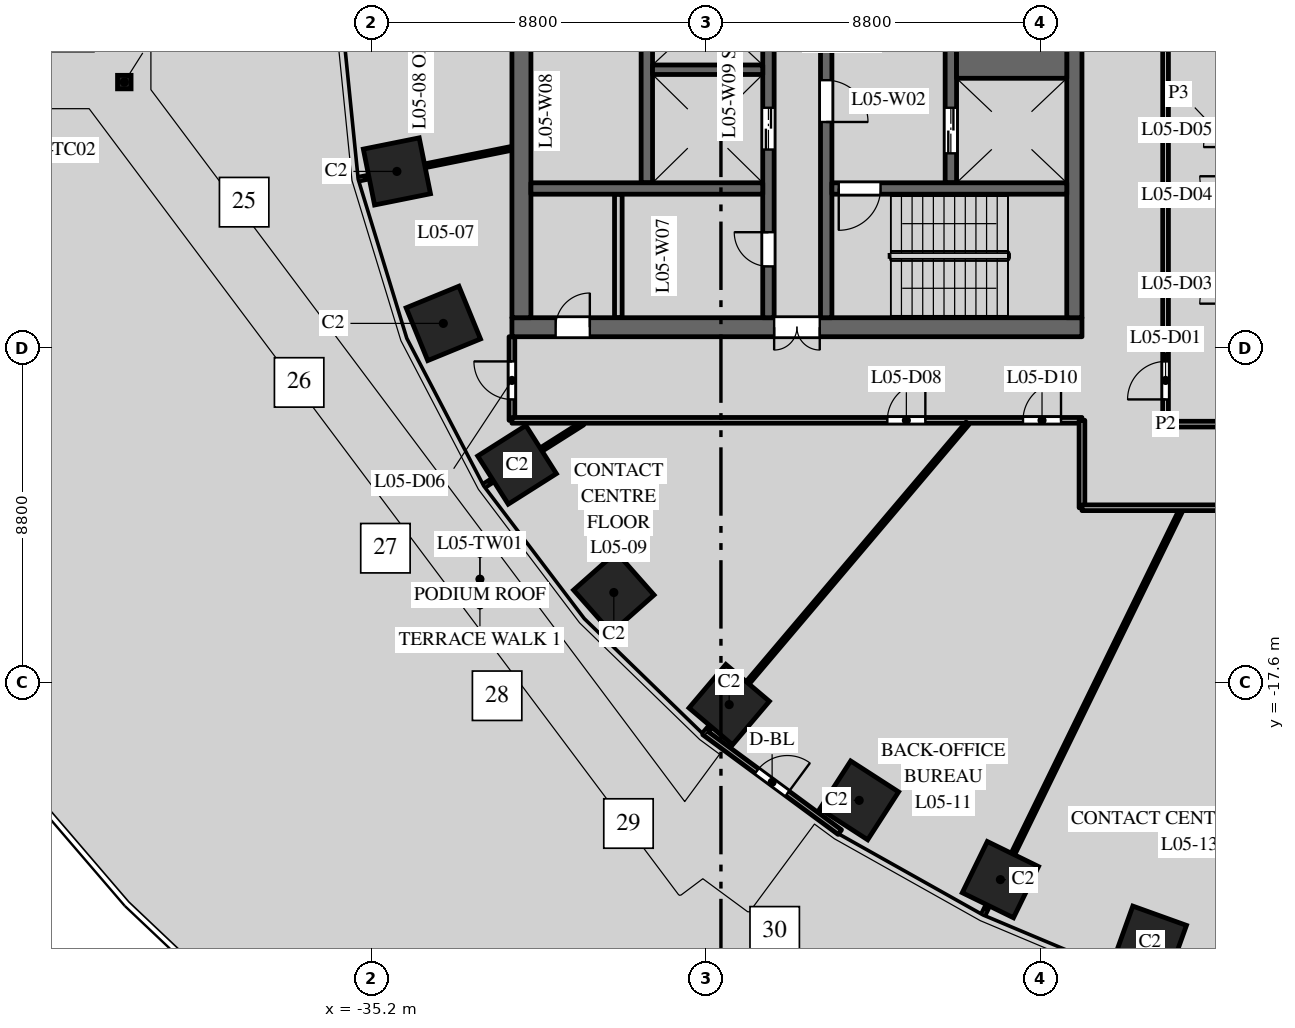
"""IFC4 building model, lengths in metres.
Left out: names, types, materials, properties, quantities, classifications, styles, units other than length and angle.
Written with IfcOpenShell. Run it as: python <this file> out.ifc"""

import sys

from ifc_helpers import new_model, si_unit, direction, frame, frame_2d, origin, origin_2d, place, context, subcontext, project, spatial, rectangle, hollow_circle, extrude, element, fill, save


model = new_model("IFC4")
c1 = context("Model", 3, precision=1e-05, world=origin(), true_north=direction((0.0, 1.0)))
c2 = subcontext(c1, "Body", "Model", "MODEL_VIEW")
j1 = project(units=[si_unit("LENGTHUNIT", "METRE"), si_unit("PLANEANGLEUNIT", "RADIAN")], contexts=[c1])
p1 = place(None, origin())
s1 = spatial("IfcSite", under=j1, at=p1, CompositionType="ELEMENT")
p2 = place(p1, origin())
s2 = spatial("IfcBuilding", under=s1, at=p2, CompositionType="ELEMENT")
p3 = place(p2, frame((0.0, 0.0, 30.5)))
s3 = spatial("IfcBuildingStorey", under=s2, at=p3, CompositionType="ELEMENT", Elevation=30.5)
for number, where, z_axis, x_axis in (
    (1, (-34.527, -4.151, 0.0), (0.0, 0.0, 1.0), (0.197, -0.98, 0.0)),
    (2, (-33.305, -8.149, 0.0), (0.0, 0.0, 1.0), (0.379, -0.925, 0.0)),
    (3, (-31.365, -11.871, 0.0), (0.0, 0.0, 1.0), (0.535, -0.845, 0.0)),
    (4, (-28.819, -15.23, 0.0), (0.0, 0.0, 1.0), (0.663, -0.749, 0.0)),
    (5, (-25.783, -18.18, 0.0), (0.0, 0.0, 1.0), (0.763, -0.646, 0.0)),
    (6, (-22.362, -20.7, 0.0), (0.0, 0.0, 1.0), (0.84, -0.542, 0.0)),
    (7, (-18.646, -22.785, 0.0), (0.0, 0.0, 1.0), (0.898, -0.439, 0.0)),
    (8, (-14.709, -24.441, 0.0), (0.0, 0.0, 1.0), (0.941, -0.338, 0.0)),
):
    element("IfcColumn", number, at=place(p3, frame(where, z_axis=z_axis, x_axis=x_axis)), inside=s3, PredefinedType="COLUMN", context=c2, shape_type="SweptSolid", body=[
        extrude(rectangle(XDim=1.5, YDim=1.5, at=origin_2d()), origin(), (0.0, 0.0, 1.0), 4.0),
    ])
p4 = place(p3, frame((-16.5, -8.25, 0.0), z_axis=(0.0, 0.0, 1.0), x_axis=(-1.0, 0.0, 0.0)))
e9 = element("IfcWall", 9, at=p4, inside=s3, PredefinedType="SHEAR", context=c2, shape_type="SweptSolid", body=[
    extrude(rectangle(XDim=15.0, YDim=0.5, at=frame_2d((7.5, 0.0))), origin(), (0.0, 0.0, 1.0), 3.7),
])
p5 = place(p4, frame((6.9, 0.0, 0.0)))
e10 = element("IfcOpeningElement", 10, at=p5, cuts=e9, PredefinedType="OPENING", context=c2, shape_type="SweptSolid", body=[
    extrude(rectangle(XDim=1.2, YDim=2.1, at=frame_2d((0.6, 1.05))), frame((0.0, 0.26, 0.0), z_axis=(0.0, -1.0, 0.0), x_axis=(1.0, 0.0, 0.0)), (0.0, 0.0, 1.0), 0.52),
])
p6 = place(p4, frame((12.95, 0.0, 0.0)))
e11 = element("IfcOpeningElement", 11, at=p6, cuts=e9, PredefinedType="OPENING", context=c2, shape_type="SweptSolid", body=[
    extrude(rectangle(XDim=0.9, YDim=2.1, at=frame_2d((0.45, 1.05))), frame((0.0, 0.26, 0.0), z_axis=(0.0, -1.0, 0.0), x_axis=(1.0, 0.0, 0.0)), (0.0, 0.0, 1.0), 0.52),
])
p7 = place(p3, frame((-27.95, -4.45, 0.0), z_axis=(0.0, 0.0, 1.0), x_axis=(0.0, 1.0, 0.0)))
e12 = element("IfcWall", 12, at=p7, inside=s3, PredefinedType="SHEAR", context=c2, shape_type="SweptSolid", body=[
    extrude(rectangle(XDim=8.9, YDim=0.3, at=frame_2d((4.45, 0.0))), origin(), (0.0, 0.0, 1.0), 3.7),
])
p8 = place(p3, frame((-19.95, -4.45, 0.0), z_axis=(0.0, 0.0, 1.0), x_axis=(0.0, 1.0, 0.0)))
e13 = element("IfcWall", 13, at=p8, inside=s3, PredefinedType="SHEAR", context=c2, shape_type="SweptSolid", body=[
    extrude(rectangle(XDim=8.9, YDim=0.3, at=frame_2d((4.45, 0.0))), origin(), (0.0, 0.0, 1.0), 3.7),
])
p9 = place(p8, frame((0.775, 0.0, 0.0)))
e14 = element("IfcOpeningElement", 14, at=p9, cuts=e13, PredefinedType="OPENING", context=c2, shape_type="SweptSolid", body=[
    extrude(rectangle(XDim=1.2, YDim=2.1, at=frame_2d((0.6, 1.05))), frame((0.0, 0.16, 0.0), z_axis=(0.0, -1.0, 0.0), x_axis=(1.0, 0.0, 0.0)), (0.0, 0.0, 1.0), 0.32),
])
p10 = place(p8, frame((7.35, 0.0, 0.0)))
e15 = element("IfcOpeningElement", 15, at=p10, cuts=e13, PredefinedType="OPENING", context=c2, shape_type="SweptSolid", body=[
    extrude(rectangle(XDim=0.9, YDim=2.1, at=frame_2d((0.45, 1.05))), frame((0.0, 0.16, 0.0), z_axis=(0.0, -1.0, 0.0), x_axis=(1.0, 0.0, 0.0)), (0.0, 0.0, 1.0), 0.32),
])
p11 = place(p3, frame((-24.75, -8.0, 0.0), z_axis=(0.0, 0.0, 1.0), x_axis=(0.0, 1.0, 0.0)))
e16 = element("IfcWall", 16, at=p11, inside=s3, PredefinedType="SHEAR", context=c2, shape_type="SweptSolid", body=[
    extrude(rectangle(XDim=16.0, YDim=0.3, at=frame_2d((8.0, 0.0))), origin(), (0.0, 0.0, 1.0), 3.7),
])
p12 = place(p11, frame((4.425, 0.0, 0.0)))
e17 = element("IfcOpeningElement", 17, at=p12, cuts=e16, PredefinedType="OPENING", context=c2, shape_type="SweptSolid", body=[
    extrude(rectangle(XDim=1.1, YDim=2.1, at=frame_2d((0.55, 1.05))), frame((0.0, 0.16, 0.0), z_axis=(0.0, -1.0, 0.0), x_axis=(1.0, 0.0, 0.0)), (0.0, 0.0, 1.0), 0.32),
])
p13 = place(p11, frame((7.45, 0.0, 0.0)))
e18 = element("IfcOpeningElement", 18, at=p13, cuts=e16, PredefinedType="OPENING", context=c2, shape_type="SweptSolid", body=[
    extrude(rectangle(XDim=1.1, YDim=2.1, at=frame_2d((0.55, 1.05))), frame((0.0, 0.16, 0.0), z_axis=(0.0, -1.0, 0.0), x_axis=(1.0, 0.0, 0.0)), (0.0, 0.0, 1.0), 0.32),
])
p14 = place(p11, frame((10.425, 0.0, 0.0)))
e19 = element("IfcOpeningElement", 19, at=p14, cuts=e16, PredefinedType="OPENING", context=c2, shape_type="SweptSolid", body=[
    extrude(rectangle(XDim=1.2, YDim=2.1, at=frame_2d((0.6, 1.05))), frame((0.0, 0.16, 0.0), z_axis=(0.0, -1.0, 0.0), x_axis=(1.0, 0.0, 0.0)), (0.0, 0.0, 1.0), 0.32),
])
p15 = place(p11, frame((13.75, 0.0, 0.0)))
e20 = element("IfcOpeningElement", 20, at=p15, cuts=e16, PredefinedType="OPENING", context=c2, shape_type="SweptSolid", body=[
    extrude(rectangle(XDim=0.9, YDim=2.1, at=frame_2d((0.45, 1.05))), frame((0.0, 0.16, 0.0), z_axis=(0.0, -1.0, 0.0), x_axis=(1.0, 0.0, 0.0)), (0.0, 0.0, 1.0), 0.32),
])
p16 = place(p11, frame((1.35, 0.0, 0.0)))
e21 = element("IfcOpeningElement", 21, at=p16, cuts=e16, PredefinedType="OPENING", context=c2, shape_type="SweptSolid", body=[
    extrude(rectangle(XDim=0.9, YDim=2.1, at=frame_2d((0.45, 1.05))), frame((0.0, 0.16, 0.0), z_axis=(0.0, -1.0, 0.0), x_axis=(1.0, 0.0, 0.0)), (0.0, 0.0, 1.0), 0.32),
])
p17 = place(p3, frame((-16.7, -8.0, 0.0), z_axis=(0.0, 0.0, 1.0), x_axis=(0.0, 1.0, 0.0)))
e22 = element("IfcWall", 22, at=p17, inside=s3, PredefinedType="SHEAR", context=c2, shape_type="SweptSolid", body=[
    extrude(rectangle(XDim=16.0, YDim=0.4, at=frame_2d((8.0, 0.0))), origin(), (0.0, 0.0, 1.0), 3.7),
])
p18 = place(p3, frame((-31.25, -8.0, 0.0), z_axis=(0.0, 0.0, 1.0), x_axis=(0.0, 1.0, 0.0)))
e23 = element("IfcWall", 23, at=p18, inside=s3, PredefinedType="SHEAR", context=c2, shape_type="SweptSolid", body=[
    extrude(rectangle(XDim=16.0, YDim=0.5, at=frame_2d((8.0, 0.0))), origin(), (0.0, 0.0, 1.0), 3.7),
])
p19 = place(p3, frame((-28.7, -8.0, 0.0), z_axis=(0.0, 0.0, 1.0), x_axis=(0.0, 1.0, 0.0)))
e24 = element("IfcWall", 24, at=p19, inside=s3, PredefinedType="PARTITIONING", context=c2, shape_type="SweptSolid", body=[
    extrude(rectangle(XDim=3.25, YDim=0.2, at=frame_2d((1.625, 0.0))), origin(), (0.0, 0.0, 1.0), 3.7),
])
p20 = place(p3, frame((-24.9, -4.6, 0.0), z_axis=(0.0, 0.0, 1.0), x_axis=(-1.0, 0.0, 0.0)))
e25 = element("IfcWall", 25, at=p20, inside=s3, PredefinedType="SHEAR", context=c2, shape_type="SweptSolid", body=[
    extrude(rectangle(XDim=6.1, YDim=0.3, at=frame_2d((3.05, 0.0))), origin(), (0.0, 0.0, 1.0), 3.7),
])
p21 = place(p3, frame((-16.9, -1.075, 0.0), z_axis=(0.0, 0.0, 1.0), x_axis=(-1.0, 0.0, 0.0)))
e26 = element("IfcWall", 26, at=p21, inside=s3, PredefinedType="SHEAR", context=c2, shape_type="SweptSolid", body=[
    extrude(rectangle(XDim=2.9, YDim=1.25, at=frame_2d((1.45, 0.0))), origin(), (0.0, 0.0, 1.0), 3.7),
])
p22 = place(p3, frame((-24.9, -1.475, 0.0), z_axis=(0.0, 0.0, 1.0), x_axis=(-1.0, 0.0, 0.0)))
e27 = element("IfcWall", 27, at=p22, inside=s3, PredefinedType="SHEAR", context=c2, shape_type="SweptSolid", body=[
    extrude(rectangle(XDim=2.9, YDim=0.25, at=frame_2d((1.45, 0.0))), origin(), (0.0, 0.0, 1.0), 3.7),
])
p23 = place(p3, frame((-23.23, -8.0, 0.0), z_axis=(0.0, 0.0, 1.0), x_axis=(0.0, 1.0, 0.0)))
e28 = element("IfcWall", 28, at=p23, inside=s3, PredefinedType="SHEAR", context=c2, shape_type="SweptSolid", body=[
    extrude(rectangle(XDim=7.875, YDim=0.3, at=frame_2d((3.938, 0.0))), origin(), (0.0, 0.0, 1.0), 3.7),
])
p24 = place(p23, frame((5.15, 0.0, 0.0)))
e29 = element("IfcOpeningElement", 29, at=p24, cuts=e28, PredefinedType="OPENING", context=c2, shape_type="SweptSolid", body=[
    extrude(rectangle(XDim=1.1, YDim=2.1, at=frame_2d((0.55, 1.05))), frame((0.0, 0.16, 0.0), z_axis=(0.0, -1.0, 0.0), x_axis=(1.0, 0.0, 0.0)), (0.0, 0.0, 1.0), 0.32),
])
p25 = place(p3, frame((-16.9, -4.6, 0.0), z_axis=(0.0, 0.0, 1.0), x_axis=(-1.0, 0.0, 0.0)))
e30 = element("IfcWall", 30, at=p25, inside=s3, PredefinedType="SHEAR", context=c2, shape_type="SweptSolid", body=[
    extrude(rectangle(XDim=6.18, YDim=0.3, at=frame_2d((3.09, 0.0))), origin(), (0.0, 0.0, 1.0), 3.7),
])
p26 = place(p25, frame((4.9, 0.0, 0.0)))
e31 = element("IfcOpeningElement", 31, at=p26, cuts=e30, PredefinedType="OPENING", context=c2, shape_type="SweptSolid", body=[
    extrude(rectangle(XDim=1.1, YDim=2.1, at=frame_2d((0.55, 1.05))), frame((0.0, 0.16, 0.0), z_axis=(0.0, -1.0, 0.0), x_axis=(1.0, 0.0, 0.0)), (0.0, 0.0, 1.0), 0.32),
])
p27 = place(p3, frame((-26.435, -18.911, 0.0), z_axis=(0.0, 0.0, 1.0), x_axis=(0.805154287598, -0.593065403782, 0.0)))
e32 = element("IfcWall", 32, at=p27, inside=s3, PredefinedType="STANDARD", context=c2, shape_type="SweptSolid", body=[
    extrude(rectangle(XDim=4.425, YDim=0.15, at=frame_2d((2.212, 0.0))), origin(), (0.0, 0.0, 1.0), 3.7),
])
p28 = place(p27, frame((1.712, 0.0, 0.0)))
e33 = element("IfcOpeningElement", 33, at=p28, cuts=e32, PredefinedType="OPENING", context=c2, shape_type="SweptSolid", body=[
    extrude(rectangle(XDim=1.0, YDim=2.4, at=frame_2d((0.5, 1.2))), frame((0.0, 0.085, 0.0), z_axis=(0.0, -1.0, 0.0), x_axis=(1.0, 0.0, 0.0)), (0.0, 0.0, 1.0), 0.17),
])
p29 = place(p3, frame((-41.7, -1.8, 0.45), z_axis=(0.0, 0.0, 1.0), x_axis=(1.0, 0.0, 0.0)))
e34 = element("IfcColumn", 34, at=p29, inside=s3, PredefinedType="COLUMN", context=c2, shape_type="SweptSolid", body=[
    extrude(hollow_circle(Radius=0.178, WallThickness=0.016, at=origin_2d()), origin(), (0.0, 0.0, 1.0), 3.55),
])
p30 = place(p3, frame((-35.512, -4.349, 0.0), z_axis=(0.0, 0.0, 1.0), x_axis=(0.980357474535, 0.197228857227, 0.0)))
e35 = element("IfcWall", 35, at=p30, inside=s3, PredefinedType="PARTITIONING", context=c2, shape_type="SweptSolid", body=[
    extrude(rectangle(XDim=4.092, YDim=0.1, at=frame_2d((2.046, 0.0))), origin(), (0.0, 0.0, 1.0), 3.2),
])
p31 = place(p3, frame((-32.212, -12.408, 0.0), z_axis=(0.0, 0.0, 1.0), x_axis=(0.844810627195, 0.535065420467, 0.0)))
e36 = element("IfcWall", 36, at=p31, inside=s3, PredefinedType="PARTITIONING", context=c2, shape_type="SweptSolid", body=[
    extrude(rectangle(XDim=3.048, YDim=0.1, at=frame_2d((1.524, 0.0))), origin(), (0.0, 0.0, 1.0), 3.7),
])
p32 = place(p3, frame((-31.5, -10.7, 0.0), z_axis=(0.0, 0.0, 1.0), x_axis=(0.0, 1.0, 0.0)))
e37 = element("IfcWall", 37, at=p32, inside=s3, PredefinedType="PARTITIONING", context=c2, shape_type="SweptSolid", body=[
    extrude(rectangle(XDim=2.2, YDim=0.15, at=frame_2d((1.1, 0.0))), origin(), (0.0, 0.0, 1.0), 3.7),
])
p33 = place(p32, frame((0.55, 0.0, 0.0)))
e38 = element("IfcOpeningElement", 38, at=p33, cuts=e37, PredefinedType="OPENING", context=c2, shape_type="SweptSolid", body=[
    extrude(rectangle(XDim=1.0, YDim=2.1, at=frame_2d((0.5, 1.05))), frame((0.0, 0.085, 0.0), z_axis=(0.0, -1.0, 0.0), x_axis=(1.0, 0.0, 0.0)), (0.0, 0.0, 1.0), 0.17),
])
p34 = place(p3, frame((-31.5, -10.7, 0.0), z_axis=(0.0, 0.0, 1.0), x_axis=(1.0, 0.0, 0.0)))
e39 = element("IfcWall", 39, at=p34, inside=s3, PredefinedType="PARTITIONING", context=c2, shape_type="SweptSolid", body=[
    extrude(rectangle(XDim=15.0, YDim=0.15, at=frame_2d((7.5, 0.0))), origin(), (0.0, 0.0, 1.0), 3.1),
])
p35 = place(p34, frame((9.879, 0.0, 0.0)))
e40 = element("IfcOpeningElement", 40, at=p35, cuts=e39, PredefinedType="OPENING", context=c2, shape_type="SweptSolid", body=[
    extrude(rectangle(XDim=1.0, YDim=2.1, at=frame_2d((0.5, 1.05))), frame((0.0, 0.085, 0.0), z_axis=(0.0, -1.0, 0.0), x_axis=(1.0, 0.0, 0.0)), (0.0, 0.0, 1.0), 0.17),
])
p36 = place(p34, frame((13.449, 0.0, 0.0)))
e41 = element("IfcOpeningElement", 41, at=p36, cuts=e39, PredefinedType="OPENING", context=c2, shape_type="SweptSolid", body=[
    extrude(rectangle(XDim=1.0, YDim=2.1, at=frame_2d((0.5, 1.05))), frame((0.0, 0.085, 0.0), z_axis=(0.0, -1.0, 0.0), x_axis=(1.0, 0.0, 0.0)), (0.0, 0.0, 1.0), 0.17),
])
p37 = place(p3, frame((-26.43, -18.945, 0.0), z_axis=(0.0, 0.0, 1.0), x_axis=(0.646400187952, 0.762998556365, 0.0)))
e42 = element("IfcWall", 42, at=p37, inside=s3, PredefinedType="PARTITIONING", context=c2, shape_type="SweptSolid", body=[
    extrude(rectangle(XDim=10.704, YDim=0.1, at=frame_2d((5.352, 0.0))), origin(), (0.0, 0.0, 1.0), 3.7),
])
p38 = place(p3, frame((-19.086, -23.685, 0.0), z_axis=(0.0, 0.0, 1.0), x_axis=(0.439199750603, 0.898389436197, 0.0)))
e43 = element("IfcWall", 43, at=p38, inside=s3, PredefinedType="PARTITIONING", context=c2, shape_type="SweptSolid", body=[
    extrude(rectangle(XDim=11.81, YDim=0.1, at=frame_2d((5.905, 0.0))), origin(), (0.0, 0.0, 1.0), 3.7),
])
p39 = place(p3, frame((-16.5, -13.0, 0.0), z_axis=(0.0, 0.0, 1.0), x_axis=(0.0, 1.0, 0.0)))
e44 = element("IfcWall", 44, at=p39, inside=s3, PredefinedType="PARTITIONING", context=c2, shape_type="SweptSolid", body=[
    extrude(rectangle(XDim=2.3, YDim=0.15, at=frame_2d((1.15, 0.0))), origin(), (0.0, 0.0, 1.0), 2.75),
])
p40 = place(p3, frame((-16.5, -13.0, 0.0), z_axis=(0.0, 0.0, 1.0), x_axis=(1.0, 0.0, 0.0)))
e45 = element("IfcWall", 45, at=p40, inside=s3, PredefinedType="PARTITIONING", context=c2, shape_type="SweptSolid", body=[
    extrude(rectangle(XDim=9.001, YDim=0.15, at=frame_2d((4.5, 0.0))), origin(), (0.0, 0.0, 1.0), 2.85),
])
p41 = place(p40, frame((7.529, 0.0, 0.0)))
e46 = element("IfcOpeningElement", 46, at=p41, cuts=e45, PredefinedType="OPENING", context=c2, shape_type="SweptSolid", body=[
    extrude(rectangle(XDim=1.0, YDim=2.1, at=frame_2d((0.5, 1.05))), frame((0.0, 0.085, 0.0), z_axis=(0.0, -1.0, 0.0), x_axis=(1.0, 0.0, 0.0)), (0.0, 0.0, 1.0), 0.17),
])
p42 = place(p3, frame((-14.3, -10.8, 0.0), z_axis=(0.0, 0.0, 1.0), x_axis=(0.0, 1.0, 0.0)))
e47 = element("IfcWall", 47, at=p42, inside=s3, PredefinedType="PARTITIONING", context=c2, shape_type="SweptSolid", body=[
    extrude(rectangle(XDim=21.6, YDim=0.15, at=frame_2d((10.8, 0.0))), origin(), (0.0, 0.0, 1.0), 2.75),
])
p43 = place(p42, frame((0.65, 0.0, 0.0)))
e48 = element("IfcOpeningElement", 48, at=p43, cuts=e47, PredefinedType="OPENING", context=c2, shape_type="SweptSolid", body=[
    extrude(rectangle(XDim=1.0, YDim=2.1, at=frame_2d((0.5, 1.05))), frame((0.0, 0.085, 0.0), z_axis=(0.0, -1.0, 0.0), x_axis=(1.0, 0.0, 0.0)), (0.0, 0.0, 1.0), 0.17),
])
p44 = place(p3, frame((-14.3, -10.8, 0.0), z_axis=(0.0, 0.0, 1.0), x_axis=(1.0, 0.0, 0.0)))
e49 = element("IfcWall", 49, at=p44, inside=s3, PredefinedType="PARTITIONING", context=c2, shape_type="SweptSolid", body=[
    extrude(rectangle(XDim=28.6, YDim=0.15, at=frame_2d((14.3, 0.0))), origin(), (0.0, 0.0, 1.0), 2.85),
])
p45 = place(p44, frame((10.627, 0.0, 0.0)))
e50 = element("IfcOpeningElement", 50, at=p45, cuts=e49, PredefinedType="OPENING", context=c2, shape_type="SweptSolid", body=[
    extrude(rectangle(XDim=1.0, YDim=2.1, at=frame_2d((0.5, 1.05))), frame((0.0, 0.085, 0.0), z_axis=(0.0, -1.0, 0.0), x_axis=(1.0, 0.0, 0.0)), (0.0, 0.0, 1.0), 0.17),
])
p46 = place(p44, frame((15.393, 0.0, 0.0)))
e51 = element("IfcOpeningElement", 51, at=p46, cuts=e49, PredefinedType="OPENING", context=c2, shape_type="SweptSolid", body=[
    extrude(rectangle(XDim=1.0, YDim=2.1, at=frame_2d((0.5, 1.05))), frame((0.0, 0.085, 0.0), z_axis=(0.0, -1.0, 0.0), x_axis=(1.0, 0.0, 0.0)), (0.0, 0.0, 1.0), 0.17),
])
p47 = place(p9, origin())
e52 = element("IfcDoor", 52, at=p47, inside=s3, OperationType="DOUBLE_DOOR_SLIDING", PredefinedType="DOOR", context=c2, shape_type="SweptSolid", body=[
    extrude(rectangle(XDim=1.2, YDim=2.1, at=frame_2d((0.6, 1.05))), frame((0.0, 0.025, 0.0), z_axis=(0.0, -1.0, 0.0), x_axis=(1.0, 0.0, 0.0)), (0.0, 0.0, 1.0), 0.05),
])
fill(e14, e52)
p48 = place(p12, origin())
e53 = element("IfcDoor", 53, at=p48, inside=s3, OperationType="DOUBLE_DOOR_SLIDING", PredefinedType="DOOR", context=c2, shape_type="SweptSolid", body=[
    extrude(rectangle(XDim=1.1, YDim=2.1, at=frame_2d((0.55, 1.05))), frame((0.0, 0.025, 0.0), z_axis=(0.0, -1.0, 0.0), x_axis=(1.0, 0.0, 0.0)), (0.0, 0.0, 1.0), 0.05),
])
fill(e17, e53)
p49 = place(p26, origin())
e54 = element("IfcDoor", 54, at=p49, inside=s3, OperationType="SINGLE_SWING_LEFT", PredefinedType="DOOR", context=c2, shape_type="SweptSolid", body=[
    extrude(rectangle(XDim=1.1, YDim=2.1, at=frame_2d((0.55, 1.05))), frame((0.0, 0.025, 0.0), z_axis=(0.0, -1.0, 0.0), x_axis=(1.0, 0.0, 0.0)), (0.0, 0.0, 1.0), 0.05),
])
fill(e31, e54)
p50 = place(p24, origin())
e55 = element("IfcDoor", 55, at=p50, inside=s3, OperationType="SINGLE_SWING_LEFT", PredefinedType="DOOR", context=c2, shape_type="SweptSolid", body=[
    extrude(rectangle(XDim=1.1, YDim=2.1, at=frame_2d((0.55, 1.05))), frame((0.0, 0.025, 0.0), z_axis=(0.0, -1.0, 0.0), x_axis=(1.0, 0.0, 0.0)), (0.0, 0.0, 1.0), 0.05),
])
fill(e29, e55)
p51 = place(p5, origin())
e56 = element("IfcDoor", 56, at=p51, inside=s3, OperationType="DOUBLE_DOOR_DOUBLE_SWING", PredefinedType="DOOR", context=c2, shape_type="SweptSolid", body=[
    extrude(rectangle(XDim=1.2, YDim=2.1, at=frame_2d((0.6, 1.05))), frame((0.0, 0.025, 0.0), z_axis=(0.0, -1.0, 0.0), x_axis=(1.0, 0.0, 0.0)), (0.0, 0.0, 1.0), 0.05),
])
fill(e10, e56)
p52 = place(p16, origin())
e57 = element("IfcDoor", 57, at=p52, inside=s3, OperationType="SINGLE_SWING_LEFT", PredefinedType="DOOR", context=c2, shape_type="SweptSolid", body=[
    extrude(rectangle(XDim=0.9, YDim=2.1, at=frame_2d((0.45, 1.05))), frame((0.0, 0.025, 0.0), z_axis=(0.0, -1.0, 0.0), x_axis=(1.0, 0.0, 0.0)), (0.0, 0.0, 1.0), 0.05),
])
fill(e21, e57)
p53 = place(p6, origin())
e58 = element("IfcDoor", 58, at=p53, inside=s3, OperationType="SINGLE_SWING_LEFT", PredefinedType="DOOR", context=c2, shape_type="SweptSolid", body=[
    extrude(rectangle(XDim=0.9, YDim=2.1, at=frame_2d((0.45, 1.05))), frame((0.0, 0.025, 0.0), z_axis=(0.0, -1.0, 0.0), x_axis=(1.0, 0.0, 0.0)), (0.0, 0.0, 1.0), 0.05),
])
fill(e11, e58)
p54 = place(p28, origin())
e59 = element("IfcDoor", 59, at=p54, inside=s3, OperationType="SINGLE_SWING_RIGHT", PredefinedType="DOOR", context=c2, shape_type="SweptSolid", body=[
    extrude(rectangle(XDim=1.0, YDim=2.4, at=frame_2d((0.5, 1.2))), frame((0.0, 0.025, 0.0), z_axis=(0.0, -1.0, 0.0), x_axis=(1.0, 0.0, 0.0)), (0.0, 0.0, 1.0), 0.05),
])
fill(e33, e59)
p55 = place(p43, origin())
e60 = element("IfcDoor", 60, at=p55, inside=s3, OperationType="SINGLE_SWING_LEFT", PredefinedType="DOOR", context=c2, shape_type="SweptSolid", body=[
    extrude(rectangle(XDim=1.0, YDim=2.1, at=frame_2d((0.5, 1.05))), frame((0.0, 0.025, 0.0), z_axis=(0.0, -1.0, 0.0), x_axis=(1.0, 0.0, 0.0)), (0.0, 0.0, 1.0), 0.05),
])
fill(e48, e60)
p56 = place(p33, origin())
e61 = element("IfcDoor", 61, at=p56, inside=s3, OperationType="SINGLE_SWING_RIGHT", PredefinedType="DOOR", context=c2, shape_type="SweptSolid", body=[
    extrude(rectangle(XDim=1.0, YDim=2.1, at=frame_2d((0.5, 1.05))), frame((0.0, 0.025, 0.0), z_axis=(0.0, -1.0, 0.0), x_axis=(1.0, 0.0, 0.0)), (0.0, 0.0, 1.0), 0.05),
])
fill(e38, e61)
p57 = place(p35, origin())
e62 = element("IfcDoor", 62, at=p57, inside=s3, OperationType="SINGLE_SWING_RIGHT", PredefinedType="DOOR", context=c2, shape_type="SweptSolid", body=[
    extrude(rectangle(XDim=1.0, YDim=2.1, at=frame_2d((0.5, 1.05))), frame((0.0, 0.025, 0.0), z_axis=(0.0, -1.0, 0.0), x_axis=(1.0, 0.0, 0.0)), (0.0, 0.0, 1.0), 0.05),
])
fill(e40, e62)
p58 = place(p36, origin())
e63 = element("IfcDoor", 63, at=p58, inside=s3, OperationType="SINGLE_SWING_RIGHT", PredefinedType="DOOR", context=c2, shape_type="SweptSolid", body=[
    extrude(rectangle(XDim=1.0, YDim=2.1, at=frame_2d((0.5, 1.05))), frame((0.0, 0.025, 0.0), z_axis=(0.0, -1.0, 0.0), x_axis=(1.0, 0.0, 0.0)), (0.0, 0.0, 1.0), 0.05),
])
fill(e41, e63)
save(model, sys.argv[1])
